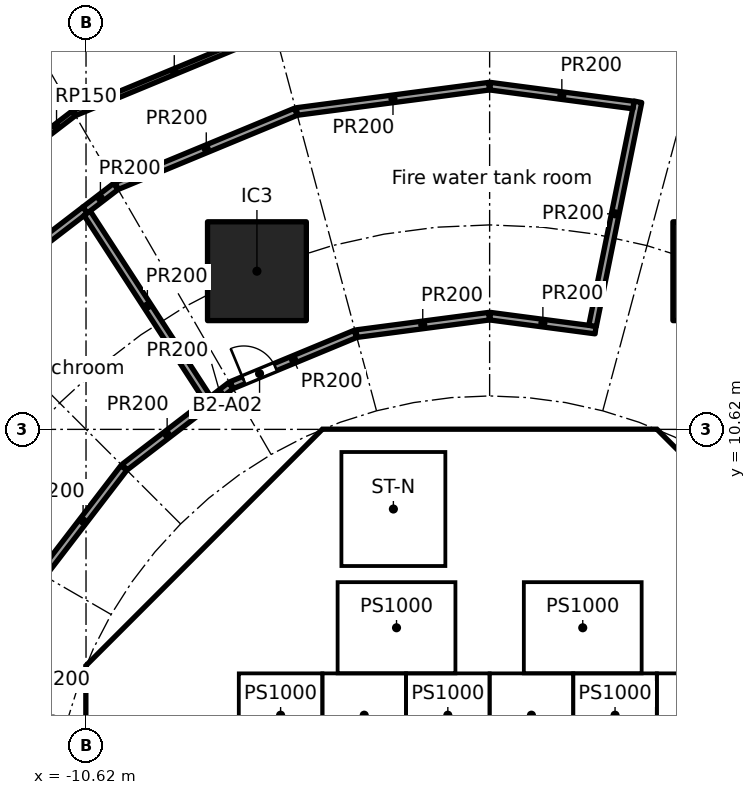
"""IFC4 building model, lengths in metres.
Left out: names, types, materials, properties, quantities, classifications, styles, units other than length and angle.
Written with IfcOpenShell. Run it as: python <this file> out.ifc"""

import sys

from ifc_helpers import new_model, si_unit, direction, frame, frame_2d, origin, origin_2d, place, context, subcontext, project, spatial, polyline, rectangle, outline, extrude, element, fill, save


model = new_model("IFC4")
c1 = context("Model", 3, precision=1e-05, world=origin(), true_north=direction((0.0, 1.0)))
c2 = subcontext(c1, "Body", "Model", "MODEL_VIEW")
j1 = project(units=[si_unit("LENGTHUNIT", "METRE"), si_unit("PLANEANGLEUNIT", "RADIAN")], contexts=[c1])
p1 = place(None, origin())
s1 = spatial("IfcSite", under=j1, at=p1, CompositionType="ELEMENT")
p2 = place(p1, origin())
s2 = spatial("IfcBuilding", under=s1, at=p2, CompositionType="ELEMENT")
p3 = place(p2, frame((0.0, 0.0, -10.0)))
s3 = spatial("IfcBuildingStorey", under=s2, at=p3, CompositionType="ELEMENT", Elevation=-10.0)
for number, where, z_axis, x_axis in (
    (1, (6.123, 14.782, 0.0), (0.0, 0.0, 1.0), (1.0, 0.0, 0.0)),
    (2, (-6.123, 14.782, 0.0), (0.0, 0.0, 1.0), (1.0, 0.0, 0.0)),
):
    element("IfcColumn", number, at=place(p3, frame(where, z_axis=z_axis, x_axis=x_axis)), inside=s3, PredefinedType="COLUMN", context=c2, shape_type="SweptSolid", body=[
        extrude(rectangle(XDim=2.6, YDim=2.6, at=origin_2d()), origin(), (0.0, 0.0, 1.0), 5.0),
    ])
p4 = place(p3, frame((9.988, 4.613, 0.0), z_axis=(0.0, 0.0, 1.0), x_axis=(-0.707106781187, 0.707106781187, 0.0)))
e3 = element("IfcWall", 3, at=p4, inside=s3, PredefinedType="SHEAR", context=c2, shape_type="SweptSolid", body=[
    extrude(rectangle(XDim=7.602, YDim=0.6, at=frame_2d((3.801, 0.0))), origin(), (0.0, 0.0, 1.0), 4.6),
])
p5 = place(p4, frame((3.201, 0.0, 0.0)))
e4 = element("IfcOpeningElement", 4, at=p5, cuts=e3, PredefinedType="OPENING", context=c2, shape_type="SweptSolid", body=[
    extrude(rectangle(XDim=1.2, YDim=2.1, at=frame_2d((0.6, 1.05))), frame((0.0, 0.31, 0.0), z_axis=(0.0, -1.0, 0.0), x_axis=(1.0, 0.0, 0.0)), (0.0, 0.0, 1.0), 0.62),
])
p6 = place(p3, frame((-4.613, 9.988, 0.0), z_axis=(0.0, 0.0, 1.0), x_axis=(-0.707106781187, -0.707106781187, 0.0)))
e5 = element("IfcWall", 5, at=p6, inside=s3, PredefinedType="SHEAR", context=c2, shape_type="SweptSolid", body=[
    extrude(rectangle(XDim=7.602, YDim=0.6, at=frame_2d((3.801, 0.0))), origin(), (0.0, 0.0, 1.0), 4.6),
])
p7 = place(p6, frame((0.351, 0.0, 0.0)))
e6 = element("IfcOpeningElement", 6, at=p7, cuts=e5, PredefinedType="OPENING", context=c2, shape_type="SweptSolid", body=[
    extrude(rectangle(XDim=1.1, YDim=2.1, at=frame_2d((0.55, 1.05))), frame((0.0, 0.31, 0.0), z_axis=(0.0, -1.0, 0.0), x_axis=(1.0, 0.0, 0.0)), (0.0, 0.0, 1.0), 0.62),
])
p8 = place(p3, frame((-10.325, 3.801, 0.0), z_axis=(0.0, 0.0, 1.0), x_axis=(0.0, -1.0, 0.0)))
e7 = element("IfcWall", 7, at=p8, inside=s3, PredefinedType="SHEAR", context=c2, shape_type="SweptSolid", body=[
    extrude(rectangle(XDim=7.602, YDim=0.6, at=frame_2d((3.801, 0.0))), origin(), (0.0, 0.0, 1.0), 4.6),
])
p9 = place(p8, frame((0.651, 0.0, 0.0)))
e8 = element("IfcOpeningElement", 8, at=p9, cuts=e7, PredefinedType="OPENING", context=c2, shape_type="SweptSolid", body=[
    extrude(rectangle(XDim=1.5, YDim=2.1, at=frame_2d((0.75, 1.05))), frame((0.0, 0.31, 0.0), z_axis=(0.0, -1.0, 0.0), x_axis=(1.0, 0.0, 0.0)), (0.0, 0.0, 1.0), 0.62),
])
p10 = place(p8, frame((5.451, 0.0, 0.0)))
e9 = element("IfcOpeningElement", 9, at=p10, cuts=e7, PredefinedType="OPENING", context=c2, shape_type="SweptSolid", body=[
    extrude(rectangle(XDim=1.5, YDim=2.1, at=frame_2d((0.75, 1.05))), frame((0.0, 0.31, 0.0), z_axis=(0.0, -1.0, 0.0), x_axis=(1.0, 0.0, 0.0)), (0.0, 0.0, 1.0), 0.62),
])
p11 = place(p3, frame((-5.8, 4.3, 0.0), z_axis=(0.0, 0.0, 1.0), x_axis=(0.0, 1.0, 0.0)))
e10 = element("IfcWall", 10, at=p11, inside=s3, PredefinedType="PARTITIONING", context=c2, shape_type="SweptSolid", body=[
    extrude(rectangle(XDim=3.927, YDim=0.15, at=frame_2d((1.963, 0.0))), origin(), (0.0, 0.0, 1.0), 4.6),
])
p12 = place(p11, frame((1.551, 0.0, 0.0)))
e11 = element("IfcOpeningElement", 11, at=p12, cuts=e10, PredefinedType="OPENING", context=c2, shape_type="SweptSolid", body=[
    extrude(rectangle(XDim=0.9, YDim=2.1, at=frame_2d((0.45, 1.05))), frame((0.0, 0.085, 0.0), z_axis=(0.0, -1.0, 0.0), x_axis=(1.0, 0.0, 0.0)), (0.0, 0.0, 1.0), 0.17),
])
p13 = place(p3, frame((4.0, 4.3, 0.0), z_axis=(0.0, 0.0, 1.0), x_axis=(0.0, 1.0, 0.0)))
e12 = element("IfcWall", 12, at=p13, inside=s3, PredefinedType="SOLIDWALL", context=c2, shape_type="SweptSolid", body=[
    extrude(rectangle(XDim=2.2, YDim=0.2, at=frame_2d((1.1, 0.0))), origin(), (0.0, 0.0, 1.0), 4.6),
])
p14 = place(p13, frame((0.55, 0.0, 0.0)))
e13 = element("IfcOpeningElement", 13, at=p14, cuts=e12, PredefinedType="OPENING", context=c2, shape_type="SweptSolid", body=[
    extrude(rectangle(XDim=1.1, YDim=2.1, at=frame_2d((0.55, 1.05))), frame((0.0, 0.11, 0.0), z_axis=(0.0, -1.0, 0.0), x_axis=(1.0, 0.0, 0.0)), (0.0, 0.0, 1.0), 0.22),
])
p15 = place(p3, frame((-4.0, 4.3, 0.0), z_axis=(0.0, 0.0, 1.0), x_axis=(0.0, 1.0, 0.0)))
e14 = element("IfcWall", 14, at=p15, inside=s3, PredefinedType="SOLIDWALL", context=c2, shape_type="SweptSolid", body=[
    extrude(rectangle(XDim=2.2, YDim=0.2, at=frame_2d((1.1, 0.0))), origin(), (0.0, 0.0, 1.0), 4.6),
])
p16 = place(p15, frame((0.55, 0.0, 0.0)))
e15 = element("IfcOpeningElement", 15, at=p16, cuts=e14, PredefinedType="OPENING", context=c2, shape_type="SweptSolid", body=[
    extrude(rectangle(XDim=1.1, YDim=2.1, at=frame_2d((0.55, 1.05))), frame((0.0, 0.11, 0.0), z_axis=(0.0, -1.0, 0.0), x_axis=(1.0, 0.0, 0.0)), (0.0, 0.0, 1.0), 0.22),
])
p17 = place(p3, frame((4.0, 7.025, 0.0), z_axis=(0.0, 0.0, 1.0), x_axis=(0.0, 1.0, 0.0)))
e16 = element("IfcWall", 16, at=p17, inside=s3, PredefinedType="SOLIDWALL", context=c2, shape_type="SweptSolid", body=[
    extrude(rectangle(XDim=3.0, YDim=0.2, at=frame_2d((1.5, 0.0))), origin(), (0.0, 0.0, 1.0), 4.6),
])
p18 = place(p17, frame((0.925, 0.0, 0.0)))
e17 = element("IfcOpeningElement", 17, at=p18, cuts=e16, PredefinedType="OPENING", context=c2, shape_type="SweptSolid", body=[
    extrude(rectangle(XDim=1.1, YDim=2.1, at=frame_2d((0.55, 1.05))), frame((0.0, 0.11, 0.0), z_axis=(0.0, -1.0, 0.0), x_axis=(1.0, 0.0, 0.0)), (0.0, 0.0, 1.0), 0.22),
])
p19 = place(p3, origin())
e18 = element("IfcWall", 18, at=p19, inside=s3, PredefinedType="SHEAR", context=c2, shape_type="SweptSolid", body=[
    extrude(outline(polyline([(-10.2, 4.825), (-9.776, 4.401), (-10.025, 4.152), (-10.025, 3.801), (-10.625, 3.801), (-10.625, 4.401), (-10.2, 4.825)])), origin(), (0.0, 0.0, 1.0), 4.6),
])
p20 = place(p3, origin())
e19 = element("IfcWall", 19, at=p20, inside=s3, PredefinedType="SHEAR", context=c2, shape_type="SweptSolid", body=[
    extrude(outline(polyline([(-4.152, 10.025), (-4.401, 9.776), (-4.825, 10.2), (-4.401, 10.625), (4.401, 10.625), (4.825, 10.2), (4.401, 9.776), (4.152, 10.025), (-4.152, 10.025)])), origin(), (0.0, 0.0, 1.0), 4.6),
])
for number, where, z_axis, x_axis in (
    (20, (-0.9, 4.3, 0.0), (0.0, 0.0, 1.0), (0.0, 1.0, 0.0)),
    (21, (0.9, 4.3, 0.0), (0.0, 0.0, 1.0), (0.0, 1.0, 0.0)),
):
    element("IfcWall", number, at=place(p3, frame(where, z_axis=z_axis, x_axis=x_axis)), inside=s3, PredefinedType="SOLIDWALL", context=c2, shape_type="SweptSolid", body=[
        extrude(rectangle(XDim=2.2, YDim=0.2, at=frame_2d((1.1, 0.0))), origin(), (0.0, 0.0, 1.0), 4.6),
    ])
p21 = place(p3, origin())
e22 = element("IfcWall", 22, at=p21, inside=s3, PredefinedType="SOLIDWALL", context=c2, shape_type="SweptSolid", body=[
    extrude(outline(polyline([(-6.5, 2.1), (-6.7, 2.1), (-6.7, 4.3), (6.7, 4.3), (6.7, 2.1), (6.5, 2.1), (6.5, 4.1), (4.5, 4.1), (4.5, 2.1), (4.3, 2.1), (4.3, 4.1), (2.3, 4.1), (2.3, 2.1), (2.1, 2.1), (2.1, 4.1), (0.1, 4.1), (0.1, 2.1), (-0.1, 2.1), (-0.1, 4.1), (-2.1, 4.1), (-2.1, 2.1), (-2.3, 2.1), (-2.3, 4.1), (-4.3, 4.1), (-4.3, 2.1), (-4.5, 2.1), (-4.5, 4.1), (-6.5, 4.1), (-6.5, 2.1)])), origin(), (0.0, 0.0, 1.0), 4.6),
])
p22 = place(p3, frame((-10.025, 4.0, 0.0), z_axis=(0.0, 0.0, 1.0), x_axis=(1.0, 0.0, 0.0)))
e23 = element("IfcWall", 23, at=p22, inside=s3, PredefinedType="PARTITIONING", context=c2, shape_type="SweptSolid", body=[
    extrude(rectangle(XDim=3.325, YDim=0.2, at=frame_2d((1.662, 0.0))), origin(), (0.0, 0.0, 1.0), 4.6),
])
p23 = place(p3, origin())
e24 = element("IfcWall", 24, at=p23, inside=s3, PredefinedType="SOLIDWALL", context=c2, shape_type="SweptSolid", body=[
    extrude(outline(polyline([(-3.9, 7.025), (-4.1, 7.025), (-4.1, 10.025), (-3.9, 10.025), (-3.9, 7.025)])), origin(), (0.0, 0.0, 1.0), 4.6),
])
p24 = place(p3, origin())
e25 = element("IfcWall", 25, at=p24, inside=s3, PredefinedType="SOLIDWALL", context=c2, shape_type="SweptSolid", body=[
    extrude(outline(polyline([(4.1, 6.5), (-4.1, 6.5), (-4.1, 7.025), (4.1, 7.025), (4.1, 6.5)])), origin(), (0.0, 0.0, 1.0), 4.6),
])
p25 = place(p3, frame((0.0, 0.0, -2.0)))
e26 = element("IfcWall", 26, at=p25, inside=s3, PredefinedType="SOLIDWALL", context=c2, shape_type="SweptSolid", body=[
    extrude(outline(polyline([(-4.4, 2.0), (-6.6, 2.0), (-6.6, 4.2), (-4.4, 4.2), (-4.4, 2.0)]), holes=[polyline([(-4.5, 2.1), (-4.5, 4.1), (-6.5, 4.1), (-6.5, 2.1), (-4.5, 2.1)])]), origin(), (0.0, 0.0, 1.0), 2.0),
])
p26 = place(p3, frame((0.0, 0.0, -2.0)))
e27 = element("IfcWall", 27, at=p26, inside=s3, PredefinedType="SOLIDWALL", context=c2, shape_type="SweptSolid", body=[
    extrude(outline(polyline([(-2.2, 2.0), (-4.4, 2.0), (-4.4, 4.2), (-2.2, 4.2), (-2.2, 2.0)]), holes=[polyline([(-2.3, 2.1), (-2.3, 4.1), (-4.3, 4.1), (-4.3, 2.1), (-2.3, 2.1)])]), origin(), (0.0, 0.0, 1.0), 2.0),
])
p27 = place(p3, frame((0.0, 0.0, -2.0)))
e28 = element("IfcWall", 28, at=p27, inside=s3, PredefinedType="SOLIDWALL", context=c2, shape_type="SweptSolid", body=[
    extrude(outline(polyline([(0.0, 2.0), (-2.2, 2.0), (-2.2, 4.2), (0.0, 4.2), (0.0, 2.0)]), holes=[polyline([(-0.1, 2.1), (-0.1, 4.1), (-2.1, 4.1), (-2.1, 2.1), (-0.1, 2.1)])]), origin(), (0.0, 0.0, 1.0), 2.0),
])
p28 = place(p3, frame((0.0, 0.0, -2.0)))
e29 = element("IfcWall", 29, at=p28, inside=s3, PredefinedType="SOLIDWALL", context=c2, shape_type="SweptSolid", body=[
    extrude(outline(polyline([(2.2, 2.0), (0.0, 2.0), (0.0, 4.2), (2.2, 4.2), (2.2, 2.0)]), holes=[polyline([(2.1, 2.1), (2.1, 4.1), (0.1, 4.1), (0.1, 2.1), (2.1, 2.1)])]), origin(), (0.0, 0.0, 1.0), 2.0),
])
p29 = place(p3, frame((0.0, 0.0, -2.0)))
e30 = element("IfcWall", 30, at=p29, inside=s3, PredefinedType="SOLIDWALL", context=c2, shape_type="SweptSolid", body=[
    extrude(outline(polyline([(4.4, 2.0), (2.2, 2.0), (2.2, 4.2), (4.4, 4.2), (4.4, 2.0)]), holes=[polyline([(4.3, 2.1), (4.3, 4.1), (2.3, 4.1), (2.3, 2.1), (4.3, 2.1)])]), origin(), (0.0, 0.0, 1.0), 2.0),
])
p30 = place(p3, frame((0.0, 0.0, -2.0)))
e31 = element("IfcWall", 31, at=p30, inside=s3, PredefinedType="SOLIDWALL", context=c2, shape_type="SweptSolid", body=[
    extrude(outline(polyline([(6.6, 2.0), (4.4, 2.0), (4.4, 4.2), (6.6, 4.2), (6.6, 2.0)]), holes=[polyline([(6.5, 2.1), (6.5, 4.1), (4.5, 4.1), (4.5, 2.1), (6.5, 2.1)])]), origin(), (0.0, 0.0, 1.0), 2.0),
])
p31 = place(p3, frame((0.0, 0.0, -2.0)))
e32 = element("IfcWall", 32, at=p31, inside=s3, PredefinedType="SOLIDWALL", context=c2, shape_type="SweptSolid", body=[
    extrude(outline(polyline([(4.0, 4.2), (0.9, 4.2), (0.9, 6.6), (4.0, 6.6), (4.0, 4.2)]), holes=[polyline([(3.9, 4.3), (3.9, 6.5), (1.0, 6.5), (1.0, 4.3), (3.9, 4.3)])]), origin(), (0.0, 0.0, 1.0), 2.0),
])
p32 = place(p3, frame((0.0, 0.0, -2.0)))
e33 = element("IfcWall", 33, at=p32, inside=s3, PredefinedType="SOLIDWALL", context=c2, shape_type="SweptSolid", body=[
    extrude(outline(polyline([(-0.9, 4.2), (-4.0, 4.2), (-4.0, 6.6), (-0.9, 6.6), (-0.9, 4.2)]), holes=[polyline([(-1.0, 4.3), (-1.0, 6.5), (-3.9, 6.5), (-3.9, 4.3), (-1.0, 4.3)])]), origin(), (0.0, 0.0, 1.0), 2.0),
])
p33 = place(p3, frame((-11.846, 18.242, 0.0), z_axis=(0.0, 0.0, 1.0), x_axis=(0.793350355506, 0.608765318837, 0.0)))
e34 = element("IfcWall", 34, at=p33, inside=s3, PredefinedType="PARTITIONING", context=c2, shape_type="SweptSolid", body=[
    extrude(rectangle(XDim=1.136, YDim=0.15, at=frame_2d((0.568, 0.0))), origin(), (0.0, 0.0, 1.0), 4.6),
])
p34 = place(p3, frame((-10.924, 18.945, 0.0), z_axis=(0.0, 0.0, 1.0), x_axis=(0.923876568882, 0.38269058712, 0.0)))
e35 = element("IfcWall", 35, at=p34, inside=s3, PredefinedType="PARTITIONING", context=c2, shape_type="SweptSolid", body=[
    extrude(rectangle(XDim=5.686, YDim=0.15, at=frame_2d((2.843, 0.0))), origin(), (0.0, 0.0, 1.0), 4.6),
])
p35 = place(p3, frame((-11.769, 6.812, 0.0), z_axis=(0.0, 0.0, 1.0), x_axis=(0.608697977542, 0.793402024283, 0.0)))
e36 = element("IfcWall", 36, at=p35, inside=s3, PredefinedType="PARTITIONING", context=c2, shape_type="SweptSolid", body=[
    extrude(rectangle(XDim=3.52, YDim=0.2, at=frame_2d((1.76, 0.0))), origin(), (0.0, 0.0, 1.0), 4.6),
])
p36 = place(p3, frame((-10.644, 16.391, 0.0), z_axis=(0.0, 0.0, 1.0), x_axis=(-0.79334357443, -0.608774155916, 0.0)))
e37 = element("IfcWall", 37, at=p36, inside=s3, PredefinedType="PARTITIONING", context=c2, shape_type="SweptSolid", body=[
    extrude(rectangle(XDim=4.083, YDim=0.2, at=frame_2d((2.042, 0.0))), origin(), (0.0, 0.0, 1.0), 4.6),
])
p37 = place(p3, frame((-9.838, 17.01, 0.0), z_axis=(0.0, 0.0, 1.0), x_axis=(-0.793293139848, -0.608839875723, 0.0)))
e38 = element("IfcWall", 38, at=p37, inside=s3, PredefinedType="PARTITIONING", context=c2, shape_type="SweptSolid", body=[
    extrude(rectangle(XDim=1.017, YDim=0.2, at=frame_2d((0.508, 0.0))), origin(), (0.0, 0.0, 1.0), 4.6),
])
p38 = place(p3, frame((-9.605, 9.626, 0.0), z_axis=(0.0, 0.0, 1.0), x_axis=(0.793389024662, 0.608714921409, 0.0)))
e39 = element("IfcWall", 39, at=p38, inside=s3, PredefinedType="PARTITIONING", context=c2, shape_type="SweptSolid", body=[
    extrude(rectangle(XDim=2.821, YDim=0.2, at=frame_2d((1.411, 0.0))), origin(), (0.0, 0.0, 1.0), 4.6),
])
p39 = place(p3, frame((-7.421, 11.427, 0.0), z_axis=(0.0, 0.0, 1.0), x_axis=(-0.544637259436, 0.838671721017, 0.0)))
e40 = element("IfcWall", 40, at=p39, inside=s3, PredefinedType="PARTITIONING", context=c2, shape_type="SweptSolid", body=[
    extrude(rectangle(XDim=5.818, YDim=0.2, at=frame_2d((2.909, 0.0))), origin(), (0.0, 0.0, 1.0), 4.6),
])
p40 = place(p3, frame((-7.366, 11.343, 0.0), z_axis=(0.0, 0.0, 1.0), x_axis=(0.793454504248, 0.608629566887, 0.0)))
e41 = element("IfcWall", 41, at=p40, inside=s3, PredefinedType="PARTITIONING", context=c2, shape_type="SweptSolid", body=[
    extrude(rectangle(XDim=0.699, YDim=0.2, at=frame_2d((0.349, 0.0))), origin(), (0.0, 0.0, 1.0), 4.6),
])
p41 = place(p3, frame((-6.786, 11.784, 0.0), z_axis=(0.0, 0.0, 1.0), x_axis=(0.92386297064, 0.382723413813, 0.0)))
e42 = element("IfcWall", 42, at=p41, inside=s3, PredefinedType="PARTITIONING", context=c2, shape_type="SweptSolid", body=[
    extrude(rectangle(XDim=3.52, YDim=0.2, at=frame_2d((1.76, 0.0))), origin(), (0.0, 0.0, 1.0), 4.6),
])
p42 = place(p41, frame((0.342, 0.0, 0.0)))
e43 = element("IfcOpeningElement", 43, at=p42, cuts=e42, PredefinedType="OPENING", context=c2, shape_type="SweptSolid", body=[
    extrude(rectangle(XDim=0.9, YDim=2.1, at=frame_2d((0.45, 1.05))), frame((0.0, 0.11, 0.0), z_axis=(0.0, -1.0, 0.0), x_axis=(1.0, 0.0, 0.0)), (0.0, 0.0, 1.0), 0.22),
])
p43 = place(p3, frame((-5.1, 18.976, 0.0), z_axis=(0.0, 0.0, 1.0), x_axis=(-0.9238779676, -0.382687210373, 0.0)))
e44 = element("IfcWall", 44, at=p43, inside=s3, PredefinedType="PARTITIONING", context=c2, shape_type="SweptSolid", body=[
    extrude(rectangle(XDim=5.1, YDim=0.2, at=frame_2d((2.55, 0.0))), origin(), (0.0, 0.0, 1.0), 4.6),
])
p44 = place(p3, frame((-3.505, 13.139, 0.0), z_axis=(0.0, 0.0, 1.0), x_axis=(0.991452406768, 0.130468866457, 0.0)))
e45 = element("IfcWall", 45, at=p44, inside=s3, PredefinedType="PARTITIONING", context=c2, shape_type="SweptSolid", body=[
    extrude(rectangle(XDim=3.52, YDim=0.2, at=frame_2d((1.76, 0.0))), origin(), (0.0, 0.0, 1.0), 4.6),
])
p45 = place(p3, frame((0.015, 13.598, 0.0), z_axis=(0.0, 0.0, 1.0), x_axis=(0.99144389086, -0.13053356379, 0.0)))
e46 = element("IfcWall", 46, at=p45, inside=s3, PredefinedType="PARTITIONING", context=c2, shape_type="SweptSolid", body=[
    extrude(rectangle(XDim=2.796, YDim=0.2, at=frame_2d((1.398, 0.0))), origin(), (0.0, 0.0, 1.0), 4.6),
])
p46 = place(p3, frame((-0.015, 19.65, 0.0), z_axis=(0.0, 0.0, 1.0), x_axis=(-0.991441907417, -0.13054862779, 0.0)))
e47 = element("IfcWall", 47, at=p46, inside=s3, PredefinedType="PARTITIONING", context=c2, shape_type="SweptSolid", body=[
    extrude(rectangle(XDim=5.1, YDim=0.2, at=frame_2d((2.55, 0.0))), origin(), (0.0, 0.0, 1.0), 4.6),
])
p47 = place(p3, frame((2.708, 13.344, 0.0), z_axis=(0.0, 0.0, 1.0), x_axis=(0.198855261413, 0.980028869477, 0.0)))
e48 = element("IfcWall", 48, at=p47, inside=s3, PredefinedType="PARTITIONING", context=c2, shape_type="SweptSolid", body=[
    extrude(rectangle(XDim=6.015, YDim=0.2, at=frame_2d((3.007, 0.0))), origin(), (0.0, 0.0, 1.0), 4.6),
])
p48 = place(p3, frame((3.785, 19.154, 0.0), z_axis=(0.0, 0.0, 1.0), x_axis=(-0.991442489306, 0.130544208598, 0.0)))
e49 = element("IfcWall", 49, at=p48, inside=s3, PredefinedType="PARTITIONING", context=c2, shape_type="SweptSolid", body=[
    extrude(rectangle(XDim=3.802, YDim=0.2, at=frame_2d((1.901, 0.0))), origin(), (0.0, 0.0, 1.0), 4.6),
])
p49 = place(p14, origin())
e50 = element("IfcDoor", 50, at=p49, inside=s3, OperationType="DOUBLE_DOOR_SLIDING", PredefinedType="DOOR", context=c2, shape_type="SweptSolid", body=[
    extrude(rectangle(XDim=1.1, YDim=2.1, at=frame_2d((0.55, 1.05))), frame((0.0, 0.025, 0.0), z_axis=(0.0, -1.0, 0.0), x_axis=(1.0, 0.0, 0.0)), (0.0, 0.0, 1.0), 0.05),
])
fill(e13, e50)
p50 = place(p16, origin())
e51 = element("IfcDoor", 51, at=p50, inside=s3, OperationType="DOUBLE_DOOR_SLIDING", PredefinedType="DOOR", context=c2, shape_type="SweptSolid", body=[
    extrude(rectangle(XDim=1.1, YDim=2.1, at=frame_2d((0.55, 1.05))), frame((0.0, 0.025, 0.0), z_axis=(0.0, -1.0, 0.0), x_axis=(1.0, 0.0, 0.0)), (0.0, 0.0, 1.0), 0.05),
])
fill(e15, e51)
p51 = place(p18, origin())
e52 = element("IfcDoor", 52, at=p51, inside=s3, OperationType="SINGLE_SWING_LEFT", PredefinedType="DOOR", context=c2, shape_type="SweptSolid", body=[
    extrude(rectangle(XDim=1.1, YDim=2.1, at=frame_2d((0.55, 1.05))), frame((0.0, 0.025, 0.0), z_axis=(0.0, -1.0, 0.0), x_axis=(1.0, 0.0, 0.0)), (0.0, 0.0, 1.0), 0.05),
])
fill(e17, e52)
p52 = place(p12, origin())
e53 = element("IfcDoor", 53, at=p52, inside=s3, OperationType="SINGLE_SWING_RIGHT", PredefinedType="DOOR", context=c2, shape_type="SweptSolid", body=[
    extrude(rectangle(XDim=0.9, YDim=2.1, at=frame_2d((0.45, 1.05))), frame((0.0, 0.025, 0.0), z_axis=(0.0, -1.0, 0.0), x_axis=(1.0, 0.0, 0.0)), (0.0, 0.0, 1.0), 0.05),
])
fill(e11, e53)
p53 = place(p9, origin())
e54 = element("IfcDoor", 54, at=p53, inside=s3, OperationType="DOUBLE_DOOR_SINGLE_SWING", PredefinedType="DOOR", context=c2, shape_type="SweptSolid", body=[
    extrude(rectangle(XDim=1.5, YDim=2.1, at=frame_2d((0.75, 1.05))), frame((0.0, 0.025, 0.0), z_axis=(0.0, -1.0, 0.0), x_axis=(1.0, 0.0, 0.0)), (0.0, 0.0, 1.0), 0.05),
])
fill(e8, e54)
p54 = place(p7, origin())
e55 = element("IfcDoor", 55, at=p54, inside=s3, OperationType="SINGLE_SWING_LEFT", PredefinedType="DOOR", context=c2, shape_type="SweptSolid", body=[
    extrude(rectangle(XDim=1.1, YDim=2.1, at=frame_2d((0.55, 1.05))), frame((0.0, 0.025, 0.0), z_axis=(0.0, -1.0, 0.0), x_axis=(1.0, 0.0, 0.0)), (0.0, 0.0, 1.0), 0.05),
])
fill(e6, e55)
p55 = place(p42, origin())
e56 = element("IfcDoor", 56, at=p55, inside=s3, OperationType="SINGLE_SWING_LEFT", PredefinedType="DOOR", context=c2, shape_type="SweptSolid", body=[
    extrude(rectangle(XDim=0.9, YDim=2.1, at=frame_2d((0.45, 1.05))), frame((0.0, 0.025, 0.0), z_axis=(0.0, -1.0, 0.0), x_axis=(1.0, 0.0, 0.0)), (0.0, 0.0, 1.0), 0.05),
])
fill(e43, e56)
save(model, sys.argv[1])
